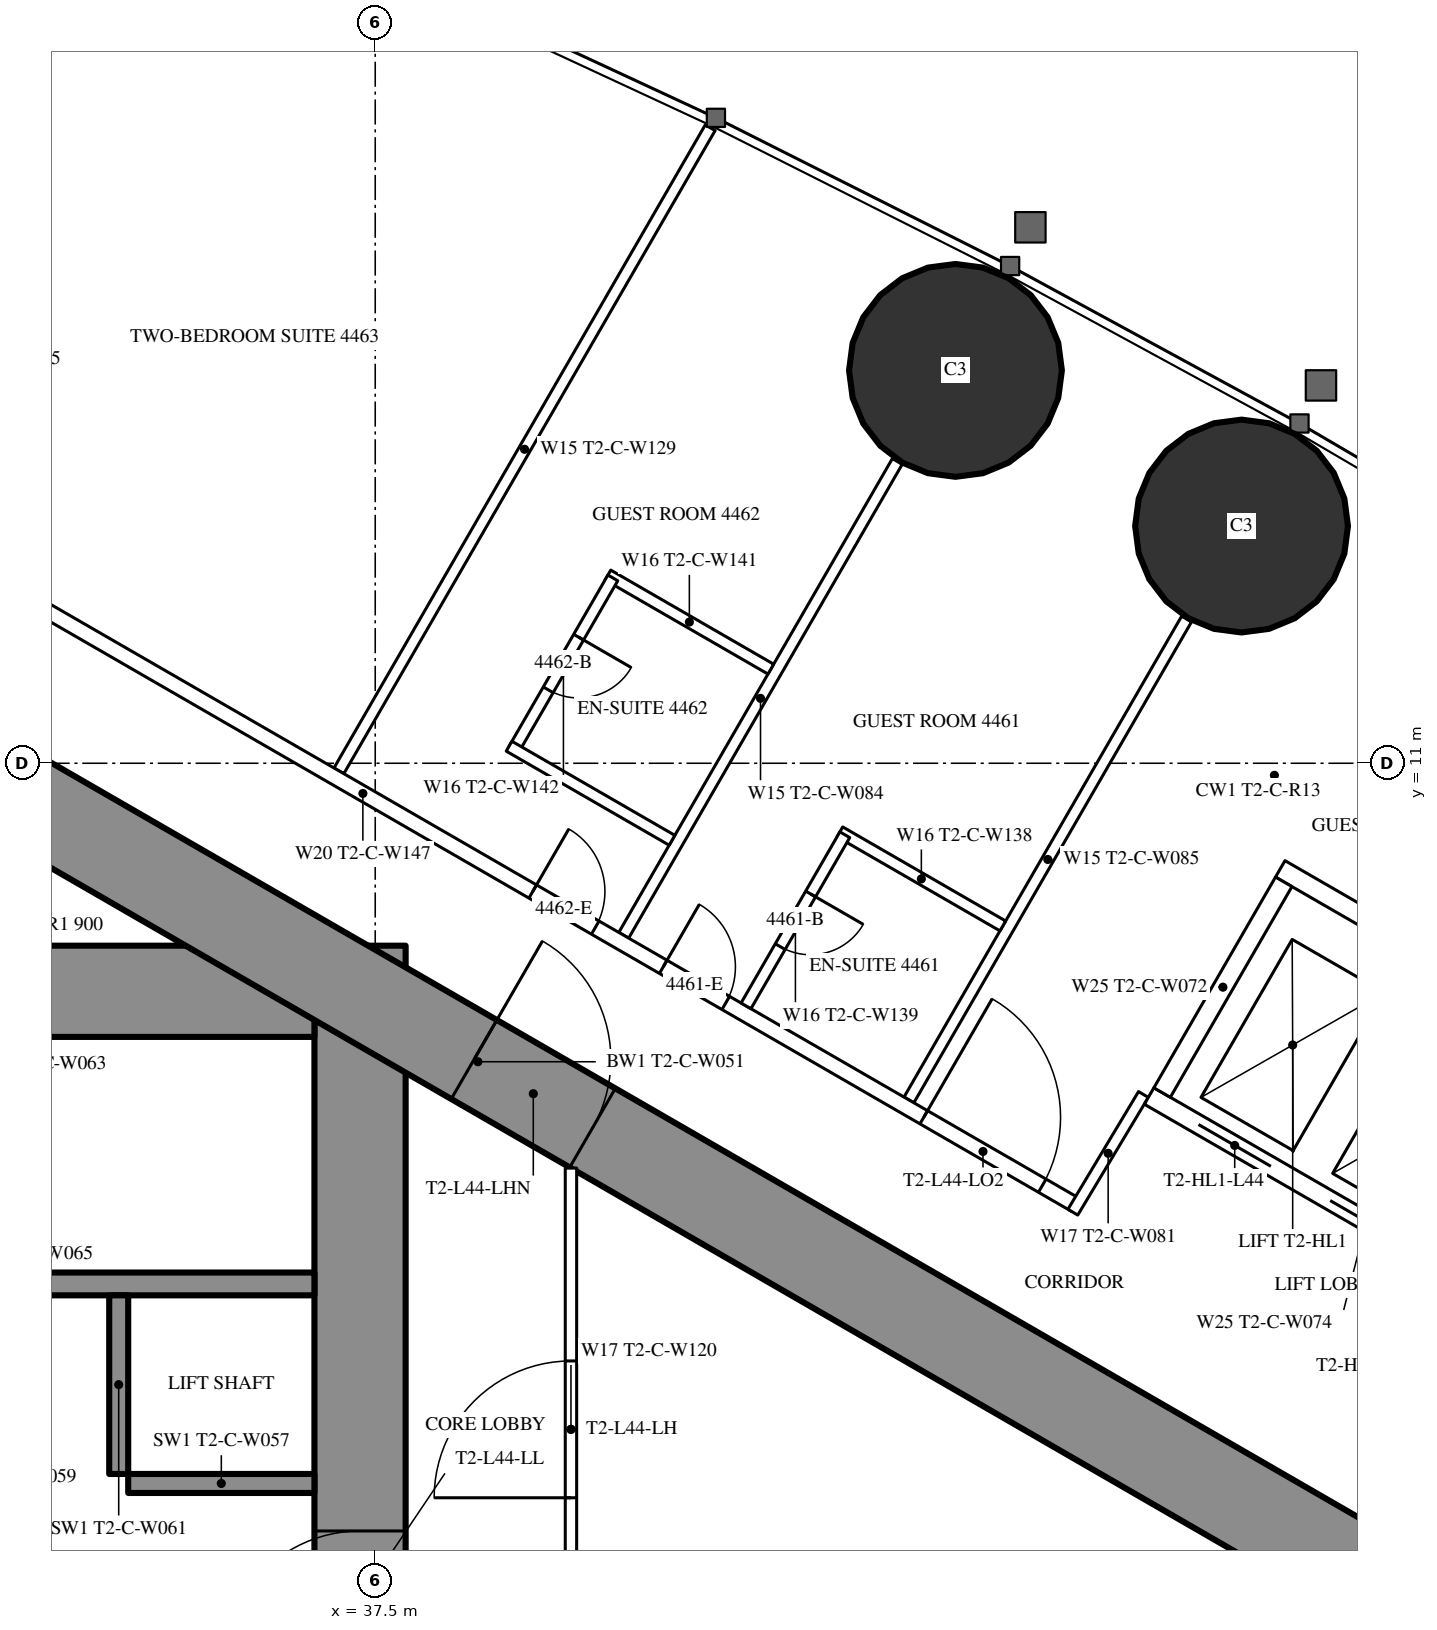
"""IFC4 building model, lengths in metres.
Left out: names, types, materials, properties, quantities, classifications, styles, units other than length and angle.
Written with IfcOpenShell. Run it as: python <this file> out.ifc"""

import sys

from ifc_helpers import new_model, si_unit, direction, frame, frame_2d, origin, origin_2d, place, context, subcontext, project, spatial, rectangle, circle, extrude, element, fill, save


model = new_model("IFC4")
c1 = context("Model", 3, precision=1e-05, world=origin(), true_north=direction((0.0, 1.0)))
c2 = subcontext(c1, "Body", "Model", "MODEL_VIEW")
j1 = project(units=[si_unit("LENGTHUNIT", "METRE"), si_unit("PLANEANGLEUNIT", "RADIAN")], contexts=[c1])
p1 = place(None, origin())
s1 = spatial("IfcSite", under=j1, at=p1, CompositionType="ELEMENT")
p2 = place(p1, origin())
s2 = spatial("IfcBuilding", under=s1, at=p2, CompositionType="ELEMENT")
p3 = place(p2, frame((0.0, 0.0, 166.8)))
s3 = spatial("IfcBuildingStorey", under=s2, at=p3, CompositionType="ELEMENT", Elevation=166.8)
for number, where, z_axis, x_axis in (
    (1, (48.897, 14.121, 0.0), (0.0, 0.0, 1.0), (1.0, 0.0, 0.0)),
    (2, (45.134, 16.168, 0.0), (0.0, 0.0, 1.0), (1.0, 0.0, 0.0)),
):
    element("IfcColumn", number, at=place(p3, frame(where, z_axis=z_axis, x_axis=x_axis)), inside=s3, PredefinedType="COLUMN", context=c2, shape_type="SweptSolid", body=[
        extrude(circle(Radius=1.4, at=origin_2d()), origin(), (0.0, 0.0, 1.0), 3.5),
    ])
p4 = place(p3, frame((37.3, -8.6, 0.0), z_axis=(0.0, 0.0, 1.0), x_axis=(0.0, 1.0, 0.0)))
e3 = element("IfcWall", 3, at=p4, inside=s3, PredefinedType="SHEAR", context=c2, shape_type="SweptSolid", body=[
    extrude(rectangle(XDim=17.2, YDim=1.2, at=frame_2d((8.6, 0.0))), origin(), (0.0, 0.0, 1.0), 3.5),
])
p5 = place(p4, frame((7.7, 0.0, 0.0)))
e4 = element("IfcOpeningElement", 4, at=p5, cuts=e3, PredefinedType="OPENING", context=c2, shape_type="SweptSolid", body=[
    extrude(rectangle(XDim=1.8, YDim=2.2, at=frame_2d((0.9, 1.1))), frame((0.0, 0.61, 0.0), z_axis=(0.0, -1.0, 0.0), x_axis=(1.0, 0.0, 0.0)), (0.0, 0.0, 1.0), 1.22),
])
p6 = place(p3, frame((28.3, 8.0, 0.0), z_axis=(0.0, 0.0, 1.0), x_axis=(1.0, 0.0, 0.0)))
e5 = element("IfcWall", 5, at=p6, inside=s3, PredefinedType="SHEAR", context=c2, shape_type="SweptSolid", body=[
    extrude(rectangle(XDim=8.4, YDim=1.2, at=frame_2d((4.2, 0.0))), origin(), (0.0, 0.0, 1.0), 3.5),
])
p7 = place(p6, frame((0.25, 0.0, 0.0)))
e6 = element("IfcOpeningElement", 6, at=p7, cuts=e5, PredefinedType="OPENING", context=c2, shape_type="SweptSolid", body=[
    extrude(rectangle(XDim=1.0, YDim=2.2, at=frame_2d((0.5, 1.1))), frame((0.0, 0.61, 0.0), z_axis=(0.0, -1.0, 0.0), x_axis=(1.0, 0.0, 0.0)), (0.0, 0.0, 1.0), 1.22),
])
p8 = place(p3, frame((28.3, 4.15, 0.0), z_axis=(0.0, 0.0, 1.0), x_axis=(1.0, 0.0, 0.0)))
e7 = element("IfcWall", 7, at=p8, inside=s3, PredefinedType="SHEAR", context=c2, shape_type="SweptSolid", body=[
    extrude(rectangle(XDim=8.4, YDim=0.3, at=frame_2d((4.2, 0.0))), origin(), (0.0, 0.0, 1.0), 3.5),
])
p9 = place(p3, frame((34.125, 1.65, 0.0), z_axis=(0.0, 0.0, 1.0), x_axis=(0.0, 1.0, 0.0)))
e8 = element("IfcWall", 8, at=p9, inside=s3, PredefinedType="SHEAR", context=c2, shape_type="SweptSolid", body=[
    extrude(rectangle(XDim=2.35, YDim=0.25, at=frame_2d((1.175, 0.0))), origin(), (0.0, 0.0, 1.0), 3.5),
])
p10 = place(p3, frame((34.25, 1.525, 0.0), z_axis=(0.0, 0.0, 1.0), x_axis=(1.0, 0.0, 0.0)))
e9 = element("IfcWall", 9, at=p10, inside=s3, PredefinedType="SHEAR", context=c2, shape_type="SweptSolid", body=[
    extrude(rectangle(XDim=2.45, YDim=0.25, at=frame_2d((1.225, 0.0))), origin(), (0.0, 0.0, 1.0), 3.5),
])
p11 = place(p3, frame((27.2, -13.8, 0.0), z_axis=(0.0, 0.0, 1.0), x_axis=(0.866027159892, 0.499996958321, 0.0)))
e10 = element("IfcWall", 10, at=p11, inside=s3, PredefinedType="SHEAR", context=c2, shape_type="SweptSolid", body=[
    extrude(rectangle(XDim=27.947, YDim=1.2, at=frame_2d((13.973, 0.0))), origin(), (0.0, 0.0, 1.0), 3.5),
])
p12 = place(p11, frame((4.6, 0.0, 0.0)))
e11 = element("IfcOpeningElement", 11, at=p12, cuts=e10, PredefinedType="OPENING", context=c2, shape_type="SweptSolid", body=[
    extrude(rectangle(XDim=1.0, YDim=2.2, at=frame_2d((0.5, 1.1))), frame((0.0, 0.61, 0.0), z_axis=(0.0, -1.0, 0.0), x_axis=(1.0, 0.0, 0.0)), (0.0, 0.0, 1.0), 1.22),
])
p13 = place(p11, frame((13.395, 0.0, 0.0)))
e12 = element("IfcOpeningElement", 12, at=p13, cuts=e10, PredefinedType="OPENING", context=c2, shape_type="SweptSolid", body=[
    extrude(rectangle(XDim=1.8, YDim=2.2, at=frame_2d((0.9, 1.1))), frame((0.0, 0.61, 0.0), z_axis=(0.0, -1.0, 0.0), x_axis=(1.0, 0.0, 0.0)), (0.0, 0.0, 1.0), 1.22),
])
p14 = place(p3, frame((27.2, 13.8, 0.0), z_axis=(0.0, 0.0, 1.0), x_axis=(0.866024515034, -0.500001539357, 0.0)))
e13 = element("IfcWall", 13, at=p14, inside=s3, PredefinedType="SHEAR", context=c2, shape_type="SweptSolid", body=[
    extrude(rectangle(XDim=26.907, YDim=1.2, at=frame_2d((13.454, 0.0))), origin(), (0.0, 0.0, 1.0), 3.5),
])
p15 = place(p14, frame((4.6, 0.0, 0.0)))
e14 = element("IfcOpeningElement", 14, at=p15, cuts=e13, PredefinedType="OPENING", context=c2, shape_type="SweptSolid", body=[
    extrude(rectangle(XDim=1.0, YDim=2.2, at=frame_2d((0.5, 1.1))), frame((0.0, 0.61, 0.0), z_axis=(0.0, -1.0, 0.0), x_axis=(1.0, 0.0, 0.0)), (0.0, 0.0, 1.0), 1.22),
])
p16 = place(p14, frame((13.395, 0.0, 0.0)))
e15 = element("IfcOpeningElement", 15, at=p16, cuts=e13, PredefinedType="OPENING", context=c2, shape_type="SweptSolid", body=[
    extrude(rectangle(XDim=1.8, YDim=2.2, at=frame_2d((0.9, 1.1))), frame((0.0, 0.61, 0.0), z_axis=(0.0, -1.0, 0.0), x_axis=(1.0, 0.0, 0.0)), (0.0, 0.0, 1.0), 1.22),
])
p17 = place(p3, frame((37.022, 10.9, 0.0), z_axis=(0.0, 0.0, 1.0), x_axis=(0.499998620953, 0.866026199976, 0.0)))
e16 = element("IfcWall", 16, at=p17, inside=s3, PredefinedType="PARTITIONING", context=c2, shape_type="SweptSolid", body=[
    extrude(rectangle(XDim=9.77, YDim=0.15, at=frame_2d((4.885, 0.0))), origin(), (0.0, 0.0, 1.0), 3.25),
])
p18 = place(p3, frame((40.769, 8.737, 0.0), z_axis=(0.0, 0.0, 1.0), x_axis=(0.500013115284, 0.866017831539, 0.0)))
e17 = element("IfcWall", 17, at=p18, inside=s3, PredefinedType="PARTITIONING", context=c2, shape_type="SweptSolid", body=[
    extrude(rectangle(XDim=7.198, YDim=0.15, at=frame_2d((3.599, 0.0))), origin(), (0.0, 0.0, 1.0), 2.3),
])
p19 = place(p3, frame((44.521, 6.571, 0.0), z_axis=(0.0, 0.0, 1.0), x_axis=(0.500020376429, 0.866013639128, 0.0)))
e18 = element("IfcWall", 18, at=p19, inside=s3, PredefinedType="PARTITIONING", context=c2, shape_type="SweptSolid", body=[
    extrude(rectangle(XDim=7.306, YDim=0.15, at=frame_2d((3.653, 0.0))), origin(), (0.0, 0.0, 1.0), 2.3),
])
p20 = place(p3, frame((27.959, 16.017, 0.0), z_axis=(0.0, 0.0, 1.0), x_axis=(0.866027146794, -0.499996981007, 0.0)))
e19 = element("IfcWall", 19, at=p20, inside=s3, PredefinedType="PARTITIONING", context=c2, shape_type="SweptSolid", body=[
    extrude(rectangle(XDim=21.657, YDim=0.2, at=frame_2d((10.829, 0.0))), origin(), (0.0, 0.0, 1.0), 3.25),
])
p21 = place(p20, frame((15.391, 0.0, 0.0)))
e20 = element("IfcOpeningElement", 20, at=p21, cuts=e19, PredefinedType="OPENING", context=c2, shape_type="SweptSolid", body=[
    extrude(rectangle(XDim=0.95, YDim=2.2, at=frame_2d((0.475, 1.1))), frame((0.0, 0.11, 0.0), z_axis=(0.0, -1.0, 0.0), x_axis=(1.0, 0.0, 0.0)), (0.0, 0.0, 1.0), 0.22),
])
p22 = place(p20, frame((13.409, 0.0, 0.0)))
e21 = element("IfcOpeningElement", 21, at=p22, cuts=e19, PredefinedType="OPENING", context=c2, shape_type="SweptSolid", body=[
    extrude(rectangle(XDim=0.95, YDim=2.2, at=frame_2d((0.475, 1.1))), frame((0.0, 0.11, 0.0), z_axis=(0.0, -1.0, 0.0), x_axis=(1.0, 0.0, 0.0)), (0.0, 0.0, 1.0), 0.22),
])
p23 = place(p20, frame((0.6, 0.0, 0.0)))
e22 = element("IfcOpeningElement", 22, at=p23, cuts=e19, PredefinedType="OPENING", context=c2, shape_type="SweptSolid", body=[
    extrude(rectangle(XDim=0.95, YDim=2.2, at=frame_2d((0.475, 1.1))), frame((0.0, 0.11, 0.0), z_axis=(0.0, -1.0, 0.0), x_axis=(1.0, 0.0, 0.0)), (0.0, 0.0, 1.0), 0.22),
])
p24 = place(p20, frame((19.349, 0.0, 0.0)))
e23 = element("IfcOpeningElement", 23, at=p24, cuts=e19, PredefinedType="OPENING", context=c2, shape_type="SweptSolid", body=[
    extrude(rectangle(XDim=1.8, YDim=2.2, at=frame_2d((0.9, 1.1))), frame((0.0, 0.11, 0.0), z_axis=(0.0, -1.0, 0.0), x_axis=(1.0, 0.0, 0.0)), (0.0, 0.0, 1.0), 0.22),
])
p25 = place(p3, frame((47.606, 6.643, 0.0), z_axis=(0.0, 0.0, 1.0), x_axis=(-0.514237157483, -0.857648031458, 0.0)))
e24 = element("IfcWall", 24, at=p25, inside=s3, PredefinedType="PARTITIONING", context=c2, shape_type="SweptSolid", body=[
    extrude(rectangle(XDim=1.805, YDim=0.15, at=frame_2d((0.902, 0.0))), origin(), (0.0, 0.0, 1.0), 3.25),
])
p26 = place(p3, frame((43.613, 10.097, 0.0), z_axis=(0.0, 0.0, 1.0), x_axis=(0.866031185235, -0.4999899861, 0.0)))
e25 = element("IfcWall", 25, at=p26, inside=s3, PredefinedType="PARTITIONING", context=c2, shape_type="SweptSolid", body=[
    extrude(rectangle(XDim=2.475, YDim=0.15, at=frame_2d((1.238, 0.0))), origin(), (0.0, 0.0, 1.0), 3.25),
])
p27 = place(p3, frame((42.378, 7.808, 0.0), z_axis=(0.0, 0.0, 1.0), x_axis=(0.500006934395, 0.866021400173, 0.0)))
e26 = element("IfcWall", 26, at=p27, inside=s3, PredefinedType="PARTITIONING", context=c2, shape_type="SweptSolid", body=[
    extrude(rectangle(XDim=2.6, YDim=0.15, at=frame_2d((1.3, 0.0))), origin(), (0.0, 0.0, 1.0), 3.25),
])
p28 = place(p27, frame((0.9, 0.0, 0.0)))
e27 = element("IfcOpeningElement", 27, at=p28, cuts=e26, PredefinedType="OPENING", context=c2, shape_type="SweptSolid", body=[
    extrude(rectangle(XDim=0.8, YDim=2.2, at=frame_2d((0.4, 1.1))), frame((0.0, 0.085, 0.0), z_axis=(0.0, -1.0, 0.0), x_axis=(1.0, 0.0, 0.0)), (0.0, 0.0, 1.0), 0.17),
])
p29 = place(p3, frame((40.561, 13.476, 0.0), z_axis=(0.0, 0.0, 1.0), x_axis=(0.866006523861, -0.500032699561, 0.0)))
e28 = element("IfcWall", 28, at=p29, inside=s3, PredefinedType="PARTITIONING", context=c2, shape_type="SweptSolid", body=[
    extrude(rectangle(XDim=2.475, YDim=0.15, at=frame_2d((1.237, 0.0))), origin(), (0.0, 0.0, 1.0), 3.25),
])
p30 = place(p3, frame((39.326, 11.187, 0.0), z_axis=(0.0, 0.0, 1.0), x_axis=(0.500047596559, 0.865997922154, 0.0)))
e29 = element("IfcWall", 29, at=p30, inside=s3, PredefinedType="PARTITIONING", context=c2, shape_type="SweptSolid", body=[
    extrude(rectangle(XDim=2.6, YDim=0.15, at=frame_2d((1.3, 0.0))), origin(), (0.0, 0.0, 1.0), 3.25),
])
p31 = place(p30, frame((0.9, 0.0, 0.0)))
e30 = element("IfcOpeningElement", 30, at=p31, cuts=e29, PredefinedType="OPENING", context=c2, shape_type="SweptSolid", body=[
    extrude(rectangle(XDim=0.8, YDim=2.2, at=frame_2d((0.4, 1.1))), frame((0.0, 0.085, 0.0), z_axis=(0.0, -1.0, 0.0), x_axis=(1.0, 0.0, 0.0)), (0.0, 0.0, 1.0), 0.17),
])
p32 = place(p3, frame((39.261, 11.224, 0.0), z_axis=(0.0, 0.0, 1.0), x_axis=(0.866006523861, -0.500032699561, 0.0)))
e31 = element("IfcWall", 31, at=p32, inside=s3, PredefinedType="PARTITIONING", context=c2, shape_type="SweptSolid", body=[
    extrude(rectangle(XDim=2.475, YDim=0.15, at=frame_2d((1.237, 0.0))), origin(), (0.0, 0.0, 1.0), 3.25),
])
p33 = place(p3, frame((40.075, -1.2, 0.0), z_axis=(0.0, 0.0, 1.0), x_axis=(0.0, 1.0, 0.0)))
e32 = element("IfcWall", 32, at=p33, inside=s3, PredefinedType="PARTITIONING", context=c2, shape_type="SweptSolid", body=[
    extrude(rectangle(XDim=6.874, YDim=0.15, at=frame_2d((3.437, 0.0))), origin(), (0.0, 0.0, 1.0), 3.25),
])
p34 = place(p33, frame((2.537, 0.0, 0.0)))
e33 = element("IfcOpeningElement", 33, at=p34, cuts=e32, PredefinedType="OPENING", context=c2, shape_type="SweptSolid", body=[
    extrude(rectangle(XDim=1.8, YDim=2.2, at=frame_2d((0.9, 1.1))), frame((0.0, 0.085, 0.0), z_axis=(0.0, -1.0, 0.0), x_axis=(1.0, 0.0, 0.0)), (0.0, 0.0, 1.0), 0.17),
])
p35 = place(p3, frame((47.681, 6.622, 0.0), z_axis=(0.0, 0.0, 1.0), x_axis=(0.86603344179, -0.499986077507, 0.0)))
e34 = element("IfcWall", 34, at=p35, inside=s3, PredefinedType="PARTITIONING", context=c2, shape_type="SweptSolid", body=[
    extrude(rectangle(XDim=6.6, YDim=0.25, at=frame_2d((3.3, 0.0))), origin(), (0.0, 0.0, 1.0), 3.25),
])
p36 = place(p35, frame((0.75, 0.0, 0.0)))
e35 = element("IfcOpeningElement", 35, at=p36, cuts=e34, PredefinedType="OPENING", context=c2, shape_type="SweptSolid", body=[
    extrude(rectangle(XDim=1.1, YDim=2.2, at=frame_2d((0.55, 1.1))), frame((0.0, 0.135, 0.0), z_axis=(0.0, -1.0, 0.0), x_axis=(1.0, 0.0, 0.0)), (0.0, 0.0, 1.0), 0.27),
])
p37 = place(p35, frame((2.75, 0.0, 0.0)))
e36 = element("IfcOpeningElement", 36, at=p37, cuts=e34, PredefinedType="OPENING", context=c2, shape_type="SweptSolid", body=[
    extrude(rectangle(XDim=1.1, YDim=2.2, at=frame_2d((0.55, 1.1))), frame((0.0, 0.135, 0.0), z_axis=(0.0, -1.0, 0.0), x_axis=(1.0, 0.0, 0.0)), (0.0, 0.0, 1.0), 0.27),
])
p38 = place(p35, frame((4.75, 0.0, 0.0)))
e37 = element("IfcOpeningElement", 37, at=p38, cuts=e34, PredefinedType="OPENING", context=c2, shape_type="SweptSolid", body=[
    extrude(rectangle(XDim=1.1, YDim=2.2, at=frame_2d((0.55, 1.1))), frame((0.0, 0.135, 0.0), z_axis=(0.0, -1.0, 0.0), x_axis=(1.0, 0.0, 0.0)), (0.0, 0.0, 1.0), 0.27),
])
p39 = place(p3, frame((49.406, 9.611, 0.0), z_axis=(0.0, 0.0, 1.0), x_axis=(0.86603344179, -0.499986077507, 0.0)))
e38 = element("IfcWall", 38, at=p39, inside=s3, PredefinedType="PARTITIONING", context=c2, shape_type="SweptSolid", body=[
    extrude(rectangle(XDim=6.6, YDim=0.25, at=frame_2d((3.3, 0.0))), origin(), (0.0, 0.0, 1.0), 3.25),
])
p40 = place(p3, frame((47.852, 6.668, 0.0), z_axis=(0.0, 0.0, 1.0), x_axis=(0.499929347863, 0.866066190972, 0.0)))
e39 = element("IfcWall", 39, at=p40, inside=s3, PredefinedType="PARTITIONING", context=c2, shape_type="SweptSolid", body=[
    extrude(rectangle(XDim=3.201, YDim=0.25, at=frame_2d((1.6, 0.0))), origin(), (0.0, 0.0, 1.0), 3.25),
])
p41 = place(p28, origin())
e40 = element("IfcDoor", 40, at=p41, inside=s3, OperationType="SINGLE_SWING_RIGHT", PredefinedType="DOOR", context=c2, shape_type="SweptSolid", body=[
    extrude(rectangle(XDim=0.8, YDim=2.2, at=frame_2d((0.4, 1.1))), frame((0.0, 0.025, 0.0), z_axis=(0.0, -1.0, 0.0), x_axis=(1.0, 0.0, 0.0)), (0.0, 0.0, 1.0), 0.05),
])
fill(e27, e40)
p42 = place(p21, origin())
e41 = element("IfcDoor", 41, at=p42, inside=s3, OperationType="SINGLE_SWING_LEFT", PredefinedType="DOOR", context=c2, shape_type="SweptSolid", body=[
    extrude(rectangle(XDim=0.95, YDim=2.2, at=frame_2d((0.475, 1.1))), frame((0.0, 0.025, 0.0), z_axis=(0.0, -1.0, 0.0), x_axis=(1.0, 0.0, 0.0)), (0.0, 0.0, 1.0), 0.05),
])
fill(e20, e41)
p43 = place(p31, origin())
e42 = element("IfcDoor", 42, at=p43, inside=s3, OperationType="SINGLE_SWING_RIGHT", PredefinedType="DOOR", context=c2, shape_type="SweptSolid", body=[
    extrude(rectangle(XDim=0.8, YDim=2.2, at=frame_2d((0.4, 1.1))), frame((0.0, 0.025, 0.0), z_axis=(0.0, -1.0, 0.0), x_axis=(1.0, 0.0, 0.0)), (0.0, 0.0, 1.0), 0.05),
])
fill(e30, e42)
p44 = place(p22, origin())
e43 = element("IfcDoor", 43, at=p44, inside=s3, OperationType="SINGLE_SWING_LEFT", PredefinedType="DOOR", context=c2, shape_type="SweptSolid", body=[
    extrude(rectangle(XDim=0.95, YDim=2.2, at=frame_2d((0.475, 1.1))), frame((0.0, 0.025, 0.0), z_axis=(0.0, -1.0, 0.0), x_axis=(1.0, 0.0, 0.0)), (0.0, 0.0, 1.0), 0.05),
])
fill(e21, e43)
p45 = place(p24, origin())
e44 = element("IfcDoor", 44, at=p45, inside=s3, OperationType="DOUBLE_DOOR_SINGLE_SWING", PredefinedType="DOOR", context=c2, shape_type="SweptSolid", body=[
    extrude(rectangle(XDim=1.8, YDim=2.2, at=frame_2d((0.9, 1.1))), frame((0.0, 0.025, 0.0), z_axis=(0.0, -1.0, 0.0), x_axis=(1.0, 0.0, 0.0)), (0.0, 0.0, 1.0), 0.05),
])
fill(e23, e44)
p46 = place(p34, origin())
e45 = element("IfcDoor", 45, at=p46, inside=s3, OperationType="DOUBLE_DOOR_SINGLE_SWING", PredefinedType="DOOR", context=c2, shape_type="SweptSolid", body=[
    extrude(rectangle(XDim=1.8, YDim=2.2, at=frame_2d((0.9, 1.1))), frame((0.0, 0.025, 0.0), z_axis=(0.0, -1.0, 0.0), x_axis=(1.0, 0.0, 0.0)), (0.0, 0.0, 1.0), 0.05),
])
fill(e33, e45)
p47 = place(p16, origin())
e46 = element("IfcDoor", 46, at=p47, inside=s3, OperationType="DOUBLE_DOOR_SINGLE_SWING", PredefinedType="DOOR", context=c2, shape_type="SweptSolid", body=[
    extrude(rectangle(XDim=1.8, YDim=2.2, at=frame_2d((0.9, 1.1))), frame((0.0, 0.025, 0.0), z_axis=(0.0, -1.0, 0.0), x_axis=(1.0, 0.0, 0.0)), (0.0, 0.0, 1.0), 0.05),
])
fill(e15, e46)
p48 = place(p5, origin())
e47 = element("IfcDoor", 47, at=p48, inside=s3, OperationType="DOUBLE_DOOR_SINGLE_SWING", PredefinedType="DOOR", context=c2, shape_type="SweptSolid", body=[
    extrude(rectangle(XDim=1.8, YDim=2.2, at=frame_2d((0.9, 1.1))), frame((0.0, 0.025, 0.0), z_axis=(0.0, -1.0, 0.0), x_axis=(1.0, 0.0, 0.0)), (0.0, 0.0, 1.0), 0.05),
])
fill(e4, e47)
p49 = place(p36, origin())
e48 = element("IfcDoor", 48, at=p49, inside=s3, OperationType="DOUBLE_DOOR_SLIDING", PredefinedType="USERDEFINED", context=c2, shape_type="SweptSolid", body=[
    extrude(rectangle(XDim=1.1, YDim=2.2, at=frame_2d((0.55, 1.1))), frame((0.0, 0.025, 0.0), z_axis=(0.0, -1.0, 0.0), x_axis=(1.0, 0.0, 0.0)), (0.0, 0.0, 1.0), 0.05),
])
fill(e35, e48)
p50 = place(p37, origin())
e49 = element("IfcDoor", 49, at=p50, inside=s3, OperationType="DOUBLE_DOOR_SLIDING", PredefinedType="USERDEFINED", context=c2, shape_type="SweptSolid", body=[
    extrude(rectangle(XDim=1.1, YDim=2.2, at=frame_2d((0.55, 1.1))), frame((0.0, 0.025, 0.0), z_axis=(0.0, -1.0, 0.0), x_axis=(1.0, 0.0, 0.0)), (0.0, 0.0, 1.0), 0.05),
])
fill(e36, e49)
save(model, sys.argv[1])
